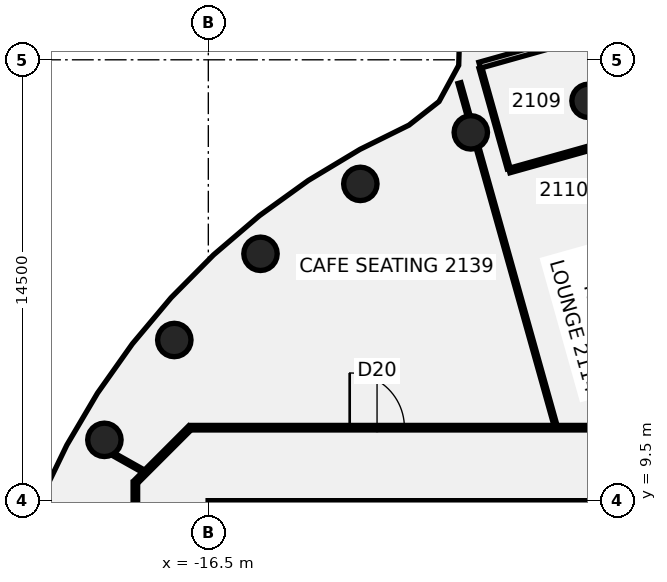
"""IFC4 building model, lengths in metres.
Left out: names, types, materials, properties, quantities, classifications, styles, units other than length and angle.
Written with IfcOpenShell. Run it as: python <this file> out.ifc"""

import sys

from ifc_helpers import new_model, si_unit, direction, frame, frame_2d, origin, origin_2d, place, context, subcontext, project, spatial, rectangle, circle, extrude, element, fill, save


model = new_model("IFC4")
c1 = context("Model", 3, precision=1e-05, world=origin(), true_north=direction((0.0, 1.0)))
c2 = subcontext(c1, "Body", "Model", "MODEL_VIEW")
j1 = project(units=[si_unit("LENGTHUNIT", "METRE"), si_unit("PLANEANGLEUNIT", "RADIAN")], contexts=[c1])
p1 = place(None, origin())
s1 = spatial("IfcSite", under=j1, at=p1, CompositionType="ELEMENT")
p2 = place(p1, origin())
s2 = spatial("IfcBuilding", under=s1, at=p2, CompositionType="ELEMENT")
p3 = place(p2, frame((0.0, 0.0, 91.0)))
s3 = spatial("IfcBuildingStorey", under=s2, at=p3, CompositionType="ELEMENT", Elevation=91.0)
for number, where, z_axis, x_axis in (
    (1, (-3.994, 22.651, -0.14), (0.0, 0.0, 1.0), (1.0, 0.0, 0.0)),
    (2, (-7.866, 21.613, -0.14), (0.0, 0.0, 1.0), (1.0, 0.0, 0.0)),
    (3, (-11.5, 19.919, -0.14), (0.0, 0.0, 1.0), (1.0, 0.0, 0.0)),
    (4, (-14.784, 17.619, -0.14), (0.0, 0.0, 1.0), (1.0, 0.0, 0.0)),
    (5, (-17.619, 14.784, -0.14), (0.0, 0.0, 1.0), (1.0, 0.0, 0.0)),
    (6, (-19.919, 11.5, -0.14), (0.0, 0.0, 1.0), (1.0, 0.0, 0.0)),
):
    element("IfcColumn", number, at=place(p3, frame(where, z_axis=z_axis, x_axis=x_axis)), inside=s3, PredefinedType="COLUMN", context=c2, shape_type="SweptSolid", body=[
        extrude(circle(Radius=0.55, at=origin_2d()), origin(), (0.0, 0.0, 1.0), 3.75),
    ])
p4 = place(p3, frame((-8.24, 23.234, 0.0), z_axis=(0.0, 0.0, 1.0), x_axis=(0.2701466455, -0.962819188594, 0.0)))
e7 = element("IfcWall", 7, at=p4, inside=s3, PredefinedType="PARTITIONING", context=c2, shape_type="SweptSolid", body=[
    extrude(rectangle(XDim=1.122, YDim=0.1, at=frame_2d((0.561, 0.0))), origin(), (0.0, 0.0, 1.0), 3.01),
])
p5 = place(p3, frame((-7.645, 21.112, 0.0), z_axis=(0.0, 0.0, 1.0), x_axis=(0.270115441224, -0.962827943307, 0.0)))
e8 = element("IfcWall", 8, at=p5, inside=s3, PredefinedType="PARTITIONING", context=c2, shape_type="SweptSolid", body=[
    extrude(rectangle(XDim=9.493, YDim=0.1, at=frame_2d((4.747, 0.0))), origin(), (0.0, 0.0, 1.0), 3.01),
])
p6 = place(p3, frame((-7.548, 23.73, 0.0), z_axis=(0.0, 0.0, 1.0), x_axis=(0.27029684464, -0.962777033262, 0.0)))
e9 = element("IfcWall", 9, at=p6, inside=s3, PredefinedType="PARTITIONING", context=c2, shape_type="SweptSolid", body=[
    extrude(rectangle(XDim=3.435, YDim=0.1, at=frame_2d((1.718, 0.0))), origin(), (0.0, 0.0, 1.0), 3.01),
])
p7 = place(p3, frame((-4.593, 33.928, 0.0), z_axis=(0.0, 0.0, 1.0), x_axis=(0.27013135505, -0.962823478639, 0.0)))
e10 = element("IfcWall", 10, at=p7, inside=s3, PredefinedType="PARTITIONING", context=c2, shape_type="SweptSolid", body=[
    extrude(rectangle(XDim=11.304, YDim=0.15, at=frame_2d((5.652, 0.0))), origin(), (0.0, 0.0, 1.0), 3.01),
])
p8 = place(p7, frame((9.375, 0.0, 0.0)))
e11 = element("IfcOpeningElement", 11, at=p8, cuts=e10, PredefinedType="OPENING", context=c2, shape_type="SweptSolid", body=[
    extrude(rectangle(XDim=1.0, YDim=2.1, at=frame_2d((0.5, 1.05))), frame((0.0, 0.085, 0.0), z_axis=(0.0, -1.0, 0.0), x_axis=(1.0, 0.0, 0.0)), (0.0, 0.0, 1.0), 0.17),
])
p9 = place(p7, frame((5.175, 0.0, 0.0)))
e12 = element("IfcOpeningElement", 12, at=p9, cuts=e10, PredefinedType="OPENING", context=c2, shape_type="SweptSolid", body=[
    extrude(rectangle(XDim=0.9, YDim=2.1, at=frame_2d((0.45, 1.05))), frame((0.0, 0.085, 0.0), z_axis=(0.0, -1.0, 0.0), x_axis=(1.0, 0.0, 0.0)), (0.0, 0.0, 1.0), 0.17),
])
p10 = place(p3, frame((-19.627, 11.027, 0.0), z_axis=(0.0, 0.0, 1.0), x_axis=(0.871956265504, -0.489583773269, 0.0)))
e13 = element("IfcWall", 13, at=p10, inside=s3, PredefinedType="PARTITIONING", context=c2, shape_type="SweptSolid", body=[
    extrude(rectangle(XDim=1.129, YDim=0.1, at=frame_2d((0.565, 0.0))), origin(), (0.0, 0.0, 1.0), 3.01),
])
p11 = place(p3, frame((-17.065, 11.9, 0.0), z_axis=(0.0, 0.0, 1.0), x_axis=(1.0, 0.0, 0.0)))
e14 = element("IfcWall", 14, at=p11, inside=s3, PredefinedType="PARTITIONING", context=c2, shape_type="SweptSolid", body=[
    extrude(rectangle(XDim=34.165, YDim=0.15, at=frame_2d((17.083, 0.0))), origin(), (0.0, 0.0, 1.0), 3.01),
])
p12 = place(p11, frame((19.067, 0.0, 0.0)))
e15 = element("IfcOpeningElement", 15, at=p12, cuts=e14, PredefinedType="OPENING", context=c2, shape_type="SweptSolid", body=[
    extrude(rectangle(XDim=1.8, YDim=2.1, at=frame_2d((0.9, 1.05))), frame((0.0, 0.085, 0.0), z_axis=(0.0, -1.0, 0.0), x_axis=(1.0, 0.0, 0.0)), (0.0, 0.0, 1.0), 0.17),
])
p13 = place(p11, frame((29.292, 0.0, 0.0)))
e16 = element("IfcOpeningElement", 16, at=p13, cuts=e14, PredefinedType="OPENING", context=c2, shape_type="SweptSolid", body=[
    extrude(rectangle(XDim=1.8, YDim=2.1, at=frame_2d((0.9, 1.05))), frame((0.0, 0.085, 0.0), z_axis=(0.0, -1.0, 0.0), x_axis=(1.0, 0.0, 0.0)), (0.0, 0.0, 1.0), 0.17),
])
p14 = place(p11, frame((5.215, 0.0, 0.0)))
e17 = element("IfcOpeningElement", 17, at=p14, cuts=e14, PredefinedType="OPENING", context=c2, shape_type="SweptSolid", body=[
    extrude(rectangle(XDim=1.8, YDim=2.1, at=frame_2d((0.9, 1.05))), frame((0.0, 0.085, 0.0), z_axis=(0.0, -1.0, 0.0), x_axis=(1.0, 0.0, 0.0)), (0.0, 0.0, 1.0), 0.17),
])
p15 = place(p3, frame((-7.574, 23.822, 0.0), z_axis=(0.0, 0.0, 1.0), x_axis=(0.962672885091, 0.270667538339, 0.0)))
e18 = element("IfcWall", 18, at=p15, inside=s3, PredefinedType="PARTITIONING", context=c2, shape_type="SweptSolid", body=[
    extrude(rectangle(XDim=13.499, YDim=0.2, at=frame_2d((6.75, 0.0))), origin(), (0.0, 0.0, 1.0), 3.01),
])
p16 = place(p15, frame((6.2, 0.0, 0.0)))
e19 = element("IfcOpeningElement", 19, at=p16, cuts=e18, PredefinedType="OPENING", context=c2, shape_type="SweptSolid", body=[
    extrude(rectangle(XDim=1.4, YDim=2.1, at=frame_2d((0.7, 1.05))), frame((0.0, 0.11, 0.0), z_axis=(0.0, -1.0, 0.0), x_axis=(1.0, 0.0, 0.0)), (0.0, 0.0, 1.0), 0.22),
])
p17 = place(p15, frame((1.95, 0.0, 0.0)))
e20 = element("IfcOpeningElement", 20, at=p17, cuts=e18, PredefinedType="OPENING", context=c2, shape_type="SweptSolid", body=[
    extrude(rectangle(XDim=0.9, YDim=2.1, at=frame_2d((0.45, 1.05))), frame((0.0, 0.11, 0.0), z_axis=(0.0, -1.0, 0.0), x_axis=(1.0, 0.0, 0.0)), (0.0, 0.0, 1.0), 0.22),
])
p18 = place(p3, frame((-6.601, 20.356, 0.0), z_axis=(0.0, 0.0, 1.0), x_axis=(0.96284855284, 0.270041967653, 0.0)))
e21 = element("IfcWall", 21, at=p18, inside=s3, PredefinedType="PARTITIONING", context=c2, shape_type="SweptSolid", body=[
    extrude(rectangle(XDim=4.0, YDim=0.15, at=frame_2d((2.0, 0.0))), origin(), (0.0, 0.0, 1.0), 3.01),
])
p19 = place(p3, frame((-18.872, 10.128, 0.0), z_axis=(0.0, 0.0, 1.0), x_axis=(0.707106781187, 0.707106781187, 0.0)))
e22 = element("IfcWall", 22, at=p19, inside=s3, PredefinedType="PARTITIONING", context=c2, shape_type="SweptSolid", body=[
    extrude(rectangle(XDim=2.505, YDim=0.15, at=frame_2d((1.253, 0.0))), origin(), (0.0, 0.0, 1.0), 3.01),
])
p20 = place(p3, frame((-18.9, -10.1, 0.0), z_axis=(0.0, 0.0, 1.0), x_axis=(0.0, 1.0, 0.0)))
e23 = element("IfcWall", 23, at=p20, inside=s3, PredefinedType="PARTITIONING", context=c2, shape_type="SweptSolid", body=[
    extrude(rectangle(XDim=20.2, YDim=0.15, at=frame_2d((10.1, 0.0))), origin(), (0.0, 0.0, 1.0), 3.01),
])
p21 = place(p20, frame((9.238, 0.0, 0.0)))
e24 = element("IfcOpeningElement", 24, at=p21, cuts=e23, PredefinedType="OPENING", context=c2, shape_type="SweptSolid", body=[
    extrude(rectangle(XDim=1.8, YDim=2.1, at=frame_2d((0.9, 1.05))), frame((0.0, 0.085, 0.0), z_axis=(0.0, -1.0, 0.0), x_axis=(1.0, 0.0, 0.0)), (0.0, 0.0, 1.0), 0.17),
])
p22 = place(p20, frame((5.326, 0.0, 0.0)))
e25 = element("IfcOpeningElement", 25, at=p22, cuts=e23, PredefinedType="OPENING", context=c2, shape_type="SweptSolid", body=[
    extrude(rectangle(XDim=0.9, YDim=2.1, at=frame_2d((0.45, 1.05))), frame((0.0, 0.085, 0.0), z_axis=(0.0, -1.0, 0.0), x_axis=(1.0, 0.0, 0.0)), (0.0, 0.0, 1.0), 0.17),
])
p23 = place(p3, frame((-16.5, 9.2, 0.0), z_axis=(0.0, 0.0, 1.0), x_axis=(1.0, 0.0, 0.0)))
e26 = element("IfcWall", 26, at=p23, inside=s3, PredefinedType="SHEAR", context=c2, shape_type="SweptSolid", body=[
    extrude(rectangle(XDim=13.0, YDim=0.6, at=frame_2d((6.5, 0.0))), origin(), (0.0, 0.0, 1.0), 3.61),
])
p24 = place(p14, origin())
e27 = element("IfcDoor", 27, at=p24, inside=s3, OperationType="DOUBLE_DOOR_SINGLE_SWING", PredefinedType="DOOR", context=c2, shape_type="SweptSolid", body=[
    extrude(rectangle(XDim=1.8, YDim=2.1, at=frame_2d((0.9, 1.05))), frame((0.0, 0.025, 0.0), z_axis=(0.0, -1.0, 0.0), x_axis=(1.0, 0.0, 0.0)), (0.0, 0.0, 1.0), 0.05),
])
fill(e17, e27)
save(model, sys.argv[1])
